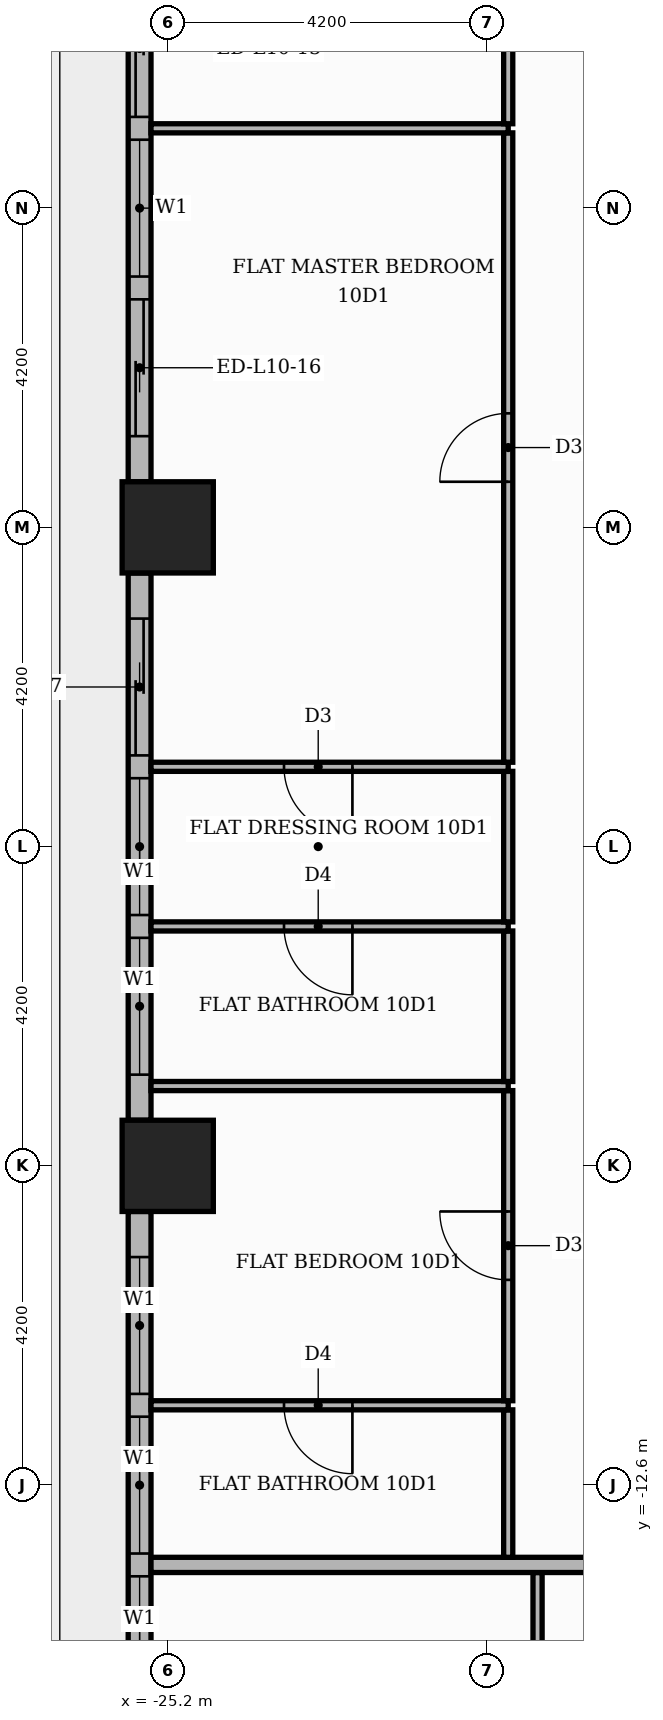
"""IFC4 building model, lengths in metres.
Left out: names, types, materials, properties, quantities, classifications, styles, units other than length and angle.
Written with IfcOpenShell. Run it as: python <this file> out.ifc"""

import sys

from ifc_helpers import new_model, si_unit, direction, frame, frame_2d, origin, origin_2d, place, context, subcontext, project, spatial, rectangle, extrude, element, fill, save


model = new_model("IFC4")
c1 = context("Model", 3, precision=1e-05, world=origin(), true_north=direction((0.0, 1.0)))
c2 = subcontext(c1, "Body", "Model", "MODEL_VIEW")
j1 = project(units=[si_unit("LENGTHUNIT", "METRE"), si_unit("PLANEANGLEUNIT", "RADIAN")], contexts=[c1])
p1 = place(None, origin())
s1 = spatial("IfcSite", under=j1, at=p1, CompositionType="ELEMENT")
p2 = place(p1, origin())
s2 = spatial("IfcBuilding", under=s1, at=p2, CompositionType="ELEMENT")
p3 = place(p2, frame((0.0, 0.0, 46.5)))
s3 = spatial("IfcBuildingStorey", under=s2, at=p3, CompositionType="ELEMENT", Elevation=46.5)
for number, where, z_axis, x_axis in (
    (1, (-25.2, 0.0, 0.0), (0.0, 0.0, 1.0), (1.0, 0.0, 0.0)),
    (2, (-25.2, -8.4, 0.0), (0.0, 0.0, 1.0), (1.0, 0.0, 0.0)),
):
    element("IfcColumn", number, at=place(p3, frame(where, z_axis=z_axis, x_axis=x_axis)), inside=s3, PredefinedType="COLUMN", context=c2, shape_type="SweptSolid", body=[
        extrude(rectangle(XDim=1.2, YDim=1.2, at=origin_2d()), origin(), (0.0, 0.0, 1.0), 3.9),
    ])
p4 = place(p3, frame((-25.57, 7.8, 0.0), z_axis=(0.0, 0.0, 1.0), x_axis=(0.0, -1.0, 0.0)))
e3 = element("IfcWall", 3, at=p4, inside=s3, PredefinedType="STANDARD", context=c2, shape_type="SweptSolid", body=[
    extrude(rectangle(XDim=7.2, YDim=0.3, at=frame_2d((3.6, 0.0))), origin(), (0.0, 0.0, 1.0), 3.48),
])
p5 = place(p4, frame((0.6, 0.0, 0.0)))
e4 = element("IfcOpeningElement", 4, at=p5, cuts=e3, PredefinedType="OPENING", context=c2, shape_type="SweptSolid", body=[
    extrude(rectangle(XDim=1.8, YDim=2.4, at=frame_2d((0.9, 1.2))), frame((0.0, 0.16, 0.0), z_axis=(0.0, -1.0, 0.0), x_axis=(1.0, 0.0, 0.0)), (0.0, 0.0, 1.0), 0.32),
])
p6 = place(p4, frame((2.7, 0.0, 0.9)))
e5 = element("IfcOpeningElement", 5, at=p6, cuts=e3, PredefinedType="OPENING", context=c2, shape_type="SweptSolid", body=[
    extrude(rectangle(XDim=1.8, YDim=2.1, at=frame_2d((0.9, 1.05))), frame((0.0, 0.16, 0.0), z_axis=(0.0, -1.0, 0.0), x_axis=(1.0, 0.0, 0.0)), (0.0, 0.0, 1.0), 0.32),
])
p7 = place(p4, frame((4.8, 0.0, 0.0)))
e6 = element("IfcOpeningElement", 6, at=p7, cuts=e3, PredefinedType="OPENING", context=c2, shape_type="SweptSolid", body=[
    extrude(rectangle(XDim=1.8, YDim=2.4, at=frame_2d((0.9, 1.2))), frame((0.0, 0.16, 0.0), z_axis=(0.0, -1.0, 0.0), x_axis=(1.0, 0.0, 0.0)), (0.0, 0.0, 1.0), 0.32),
])
p8 = place(p3, frame((-25.57, -0.6, 0.0), z_axis=(0.0, 0.0, 1.0), x_axis=(0.0, -1.0, 0.0)))
e7 = element("IfcWall", 7, at=p8, inside=s3, PredefinedType="STANDARD", context=c2, shape_type="SweptSolid", body=[
    extrude(rectangle(XDim=7.2, YDim=0.3, at=frame_2d((3.6, 0.0))), origin(), (0.0, 0.0, 1.0), 3.48),
])
p9 = place(p8, frame((0.6, 0.0, 0.0)))
e8 = element("IfcOpeningElement", 8, at=p9, cuts=e7, PredefinedType="OPENING", context=c2, shape_type="SweptSolid", body=[
    extrude(rectangle(XDim=1.8, YDim=2.4, at=frame_2d((0.9, 1.2))), frame((0.0, 0.16, 0.0), z_axis=(0.0, -1.0, 0.0), x_axis=(1.0, 0.0, 0.0)), (0.0, 0.0, 1.0), 0.32),
])
p10 = place(p8, frame((2.7, 0.0, 0.9)))
e9 = element("IfcOpeningElement", 9, at=p10, cuts=e7, PredefinedType="OPENING", context=c2, shape_type="SweptSolid", body=[
    extrude(rectangle(XDim=1.8, YDim=2.1, at=frame_2d((0.9, 1.05))), frame((0.0, 0.16, 0.0), z_axis=(0.0, -1.0, 0.0), x_axis=(1.0, 0.0, 0.0)), (0.0, 0.0, 1.0), 0.32),
])
p11 = place(p8, frame((4.8, 0.0, 0.9)))
e10 = element("IfcOpeningElement", 10, at=p11, cuts=e7, PredefinedType="OPENING", context=c2, shape_type="SweptSolid", body=[
    extrude(rectangle(XDim=1.8, YDim=2.1, at=frame_2d((0.9, 1.05))), frame((0.0, 0.16, 0.0), z_axis=(0.0, -1.0, 0.0), x_axis=(1.0, 0.0, 0.0)), (0.0, 0.0, 1.0), 0.32),
])
p12 = place(p3, frame((-25.57, -9.0, 0.0), z_axis=(0.0, 0.0, 1.0), x_axis=(0.0, -1.0, 0.0)))
e11 = element("IfcWall", 11, at=p12, inside=s3, PredefinedType="STANDARD", context=c2, shape_type="SweptSolid", body=[
    extrude(rectangle(XDim=7.2, YDim=0.3, at=frame_2d((3.6, 0.0))), origin(), (0.0, 0.0, 1.0), 3.48),
])
p13 = place(p12, frame((0.6, 0.0, 0.9)))
e12 = element("IfcOpeningElement", 12, at=p13, cuts=e11, PredefinedType="OPENING", context=c2, shape_type="SweptSolid", body=[
    extrude(rectangle(XDim=1.8, YDim=2.1, at=frame_2d((0.9, 1.05))), frame((0.0, 0.16, 0.0), z_axis=(0.0, -1.0, 0.0), x_axis=(1.0, 0.0, 0.0)), (0.0, 0.0, 1.0), 0.32),
])
p14 = place(p12, frame((2.7, 0.0, 0.9)))
e13 = element("IfcOpeningElement", 13, at=p14, cuts=e11, PredefinedType="OPENING", context=c2, shape_type="SweptSolid", body=[
    extrude(rectangle(XDim=1.8, YDim=2.1, at=frame_2d((0.9, 1.05))), frame((0.0, 0.16, 0.0), z_axis=(0.0, -1.0, 0.0), x_axis=(1.0, 0.0, 0.0)), (0.0, 0.0, 1.0), 0.32),
])
p15 = place(p12, frame((4.8, 0.0, 0.9)))
e14 = element("IfcOpeningElement", 14, at=p15, cuts=e11, PredefinedType="OPENING", context=c2, shape_type="SweptSolid", body=[
    extrude(rectangle(XDim=1.8, YDim=2.1, at=frame_2d((0.9, 1.05))), frame((0.0, 0.16, 0.0), z_axis=(0.0, -1.0, 0.0), x_axis=(1.0, 0.0, 0.0)), (0.0, 0.0, 1.0), 0.32),
])
p16 = place(p3, frame((-20.334, -20.66, 0.0), z_axis=(0.0, 0.0, 1.0), x_axis=(0.0, 1.0, 0.0)))
e15 = element("IfcWall", 15, at=p16, inside=s3, PredefinedType="PARTITIONING", context=c2, shape_type="SweptSolid", body=[
    extrude(rectangle(XDim=6.91, YDim=0.12, at=frame_2d((3.455, 0.0))), origin(), (0.0, 0.0, 1.0), 3.48),
])
p17 = place(p16, frame((4.792, 0.0, 0.0)))
e16 = element("IfcOpeningElement", 16, at=p17, cuts=e15, PredefinedType="OPENING", context=c2, shape_type="SweptSolid", body=[
    extrude(rectangle(XDim=0.9, YDim=2.1, at=frame_2d((0.45, 1.05))), frame((0.0, 0.07, 0.0), z_axis=(0.0, -1.0, 0.0), x_axis=(1.0, 0.0, 0.0)), (0.0, 0.0, 1.0), 0.14),
])
p18 = place(p3, frame((-25.42, -13.65, 0.0), z_axis=(0.0, 0.0, 1.0), x_axis=(1.0, 0.0, 0.0)))
e17 = element("IfcWall", 17, at=p18, inside=s3, PredefinedType="PARTITIONING", context=c2, shape_type="SweptSolid", body=[
    extrude(rectangle(XDim=39.07, YDim=0.2, at=frame_2d((19.535, 0.0))), origin(), (0.0, 0.0, 1.0), 3.48),
])
p19 = place(p18, frame((13.32, 0.0, 0.0)))
e18 = element("IfcOpeningElement", 18, at=p19, cuts=e17, PredefinedType="OPENING", context=c2, shape_type="SweptSolid", body=[
    extrude(rectangle(XDim=1.1, YDim=2.4, at=frame_2d((0.55, 1.2))), frame((0.0, 0.11, 0.0), z_axis=(0.0, -1.0, 0.0), x_axis=(1.0, 0.0, 0.0)), (0.0, 0.0, 1.0), 0.22),
])
p20 = place(p18, frame((21.72, 0.0, 0.0)))
e19 = element("IfcOpeningElement", 19, at=p20, cuts=e17, PredefinedType="OPENING", context=c2, shape_type="SweptSolid", body=[
    extrude(rectangle(XDim=1.1, YDim=2.4, at=frame_2d((0.55, 1.2))), frame((0.0, 0.11, 0.0), z_axis=(0.0, -1.0, 0.0), x_axis=(1.0, 0.0, 0.0)), (0.0, 0.0, 1.0), 0.22),
])
p21 = place(p3, frame((-20.72, -13.55, 0.0), z_axis=(0.0, 0.0, 1.0), x_axis=(0.0, 1.0, 0.0)))
e20 = element("IfcWall", 20, at=p21, inside=s3, PredefinedType="PARTITIONING", context=c2, shape_type="SweptSolid", body=[
    extrude(rectangle(XDim=1.94, YDim=0.12, at=frame_2d((0.97, 0.0))), origin(), (0.0, 0.0, 1.0), 3.48),
])
p22 = place(p3, frame((-25.42, -11.55, 0.0), z_axis=(0.0, 0.0, 1.0), x_axis=(1.0, 0.0, 0.0)))
e21 = element("IfcWall", 21, at=p22, inside=s3, PredefinedType="PARTITIONING", context=c2, shape_type="SweptSolid", body=[
    extrude(rectangle(XDim=4.7, YDim=0.12, at=frame_2d((2.35, 0.0))), origin(), (0.0, 0.0, 1.0), 3.48),
])
p23 = place(p22, frame((1.75, 0.0, 0.0)))
e22 = element("IfcOpeningElement", 22, at=p23, cuts=e21, PredefinedType="OPENING", context=c2, shape_type="SweptSolid", body=[
    extrude(rectangle(XDim=0.9, YDim=2.1, at=frame_2d((0.45, 1.05))), frame((0.0, 0.07, 0.0), z_axis=(0.0, -1.0, 0.0), x_axis=(1.0, 0.0, 0.0)), (0.0, 0.0, 1.0), 0.14),
])
p24 = place(p3, frame((-20.72, -11.49, 0.0), z_axis=(0.0, 0.0, 1.0), x_axis=(0.0, 1.0, 0.0)))
e23 = element("IfcWall", 23, at=p24, inside=s3, PredefinedType="PARTITIONING", context=c2, shape_type="SweptSolid", body=[
    extrude(rectangle(XDim=4.08, YDim=0.12, at=frame_2d((2.04, 0.0))), origin(), (0.0, 0.0, 1.0), 3.48),
])
p25 = place(p24, frame((1.59, 0.0, 0.0)))
e24 = element("IfcOpeningElement", 24, at=p25, cuts=e23, PredefinedType="OPENING", context=c2, shape_type="SweptSolid", body=[
    extrude(rectangle(XDim=0.9, YDim=2.1, at=frame_2d((0.45, 1.05))), frame((0.0, 0.07, 0.0), z_axis=(0.0, -1.0, 0.0), x_axis=(1.0, 0.0, 0.0)), (0.0, 0.0, 1.0), 0.14),
])
p26 = place(p3, frame((-25.42, -7.35, 0.0), z_axis=(0.0, 0.0, 1.0), x_axis=(1.0, 0.0, 0.0)))
e25 = element("IfcWall", 25, at=p26, inside=s3, PredefinedType="PARTITIONING", context=c2, shape_type="SweptSolid", body=[
    extrude(rectangle(XDim=4.7, YDim=0.12, at=frame_2d((2.35, 0.0))), origin(), (0.0, 0.0, 1.0), 3.48),
])
p27 = place(p3, frame((-20.72, -7.29, 0.0), z_axis=(0.0, 0.0, 1.0), x_axis=(0.0, 1.0, 0.0)))
e26 = element("IfcWall", 26, at=p27, inside=s3, PredefinedType="PARTITIONING", context=c2, shape_type="SweptSolid", body=[
    extrude(rectangle(XDim=1.98, YDim=0.12, at=frame_2d((0.99, 0.0))), origin(), (0.0, 0.0, 1.0), 3.48),
])
p28 = place(p3, frame((-25.42, -5.25, 0.0), z_axis=(0.0, 0.0, 1.0), x_axis=(1.0, 0.0, 0.0)))
e27 = element("IfcWall", 27, at=p28, inside=s3, PredefinedType="PARTITIONING", context=c2, shape_type="SweptSolid", body=[
    extrude(rectangle(XDim=4.7, YDim=0.12, at=frame_2d((2.35, 0.0))), origin(), (0.0, 0.0, 1.0), 3.48),
])
p29 = place(p28, frame((1.75, 0.0, 0.0)))
e28 = element("IfcOpeningElement", 28, at=p29, cuts=e27, PredefinedType="OPENING", context=c2, shape_type="SweptSolid", body=[
    extrude(rectangle(XDim=0.9, YDim=2.1, at=frame_2d((0.45, 1.05))), frame((0.0, 0.07, 0.0), z_axis=(0.0, -1.0, 0.0), x_axis=(1.0, 0.0, 0.0)), (0.0, 0.0, 1.0), 0.14),
])
p30 = place(p3, frame((-20.72, -5.19, 0.0), z_axis=(0.0, 0.0, 1.0), x_axis=(0.0, 1.0, 0.0)))
e29 = element("IfcWall", 29, at=p30, inside=s3, PredefinedType="PARTITIONING", context=c2, shape_type="SweptSolid", body=[
    extrude(rectangle(XDim=1.98, YDim=0.12, at=frame_2d((0.99, 0.0))), origin(), (0.0, 0.0, 1.0), 3.48),
])
p31 = place(p3, frame((-25.42, -3.15, 0.0), z_axis=(0.0, 0.0, 1.0), x_axis=(1.0, 0.0, 0.0)))
e30 = element("IfcWall", 30, at=p31, inside=s3, PredefinedType="PARTITIONING", context=c2, shape_type="SweptSolid", body=[
    extrude(rectangle(XDim=4.7, YDim=0.12, at=frame_2d((2.35, 0.0))), origin(), (0.0, 0.0, 1.0), 3.48),
])
p32 = place(p31, frame((1.75, 0.0, 0.0)))
e31 = element("IfcOpeningElement", 31, at=p32, cuts=e30, PredefinedType="OPENING", context=c2, shape_type="SweptSolid", body=[
    extrude(rectangle(XDim=0.9, YDim=2.1, at=frame_2d((0.45, 1.05))), frame((0.0, 0.07, 0.0), z_axis=(0.0, -1.0, 0.0), x_axis=(1.0, 0.0, 0.0)), (0.0, 0.0, 1.0), 0.14),
])
p33 = place(p3, frame((-20.72, -3.09, 0.0), z_axis=(0.0, 0.0, 1.0), x_axis=(0.0, 1.0, 0.0)))
e32 = element("IfcWall", 32, at=p33, inside=s3, PredefinedType="PARTITIONING", context=c2, shape_type="SweptSolid", body=[
    extrude(rectangle(XDim=8.28, YDim=0.12, at=frame_2d((4.14, 0.0))), origin(), (0.0, 0.0, 1.0), 3.48),
])
p34 = place(p33, frame((3.69, 0.0, 0.0)))
e33 = element("IfcOpeningElement", 33, at=p34, cuts=e32, PredefinedType="OPENING", context=c2, shape_type="SweptSolid", body=[
    extrude(rectangle(XDim=0.9, YDim=2.1, at=frame_2d((0.45, 1.05))), frame((0.0, 0.07, 0.0), z_axis=(0.0, -1.0, 0.0), x_axis=(1.0, 0.0, 0.0)), (0.0, 0.0, 1.0), 0.14),
])
p35 = place(p3, frame((-25.42, 5.25, 0.0), z_axis=(0.0, 0.0, 1.0), x_axis=(1.0, 0.0, 0.0)))
e34 = element("IfcWall", 34, at=p35, inside=s3, PredefinedType="PARTITIONING", context=c2, shape_type="SweptSolid", body=[
    extrude(rectangle(XDim=4.7, YDim=0.12, at=frame_2d((2.35, 0.0))), origin(), (0.0, 0.0, 1.0), 3.48),
])
p36 = place(p3, frame((-20.72, 5.31, 0.0), z_axis=(0.0, 0.0, 1.0), x_axis=(0.0, 1.0, 0.0)))
e35 = element("IfcWall", 35, at=p36, inside=s3, PredefinedType="PARTITIONING", context=c2, shape_type="SweptSolid", body=[
    extrude(rectangle(XDim=8.28, YDim=0.12, at=frame_2d((4.14, 0.0))), origin(), (0.0, 0.0, 1.0), 3.48),
])
p37 = place(p36, frame((3.64, 0.0, 0.0)))
e36 = element("IfcOpeningElement", 36, at=p37, cuts=e35, PredefinedType="OPENING", context=c2, shape_type="SweptSolid", body=[
    extrude(rectangle(XDim=1.0, YDim=2.1, at=frame_2d((0.5, 1.05))), frame((0.0, 0.07, 0.0), z_axis=(0.0, -1.0, 0.0), x_axis=(1.0, 0.0, 0.0)), (0.0, 0.0, 1.0), 0.14),
])
p38 = place(p5, origin())
e37 = element("IfcDoor", 37, at=p38, inside=s3, OperationType="SLIDING_TO_LEFT", PredefinedType="DOOR", context=c2, shape_type="SweptSolid", body=[
    extrude(rectangle(XDim=1.8, YDim=2.4, at=frame_2d((0.9, 1.2))), frame((0.0, 0.025, 0.0), z_axis=(0.0, -1.0, 0.0), x_axis=(1.0, 0.0, 0.0)), (0.0, 0.0, 1.0), 0.05),
])
fill(e4, e37)
p39 = place(p6, origin())
e38 = element("IfcWindow", 38, at=p39, inside=s3, PartitioningType="SINGLE_PANEL", PredefinedType="WINDOW", context=c2, shape_type="SweptSolid", body=[
    extrude(rectangle(XDim=1.8, YDim=2.1, at=frame_2d((0.9, 1.05))), frame((0.0, 0.03, 0.0), z_axis=(0.0, -1.0, 0.0), x_axis=(1.0, 0.0, 0.0)), (0.0, 0.0, 1.0), 0.06),
])
fill(e5, e38)
p40 = place(p7, origin())
e39 = element("IfcDoor", 39, at=p40, inside=s3, OperationType="SLIDING_TO_RIGHT", PredefinedType="DOOR", context=c2, shape_type="SweptSolid", body=[
    extrude(rectangle(XDim=1.8, YDim=2.4, at=frame_2d((0.9, 1.2))), frame((0.0, 0.025, 0.0), z_axis=(0.0, -1.0, 0.0), x_axis=(1.0, 0.0, 0.0)), (0.0, 0.0, 1.0), 0.05),
])
fill(e6, e39)
p41 = place(p9, origin())
e40 = element("IfcDoor", 40, at=p41, inside=s3, OperationType="SLIDING_TO_LEFT", PredefinedType="DOOR", context=c2, shape_type="SweptSolid", body=[
    extrude(rectangle(XDim=1.8, YDim=2.4, at=frame_2d((0.9, 1.2))), frame((0.0, 0.025, 0.0), z_axis=(0.0, -1.0, 0.0), x_axis=(1.0, 0.0, 0.0)), (0.0, 0.0, 1.0), 0.05),
])
fill(e8, e40)
p42 = place(p10, origin())
e41 = element("IfcWindow", 41, at=p42, inside=s3, PartitioningType="SINGLE_PANEL", PredefinedType="WINDOW", context=c2, shape_type="SweptSolid", body=[
    extrude(rectangle(XDim=1.8, YDim=2.1, at=frame_2d((0.9, 1.05))), frame((0.0, 0.03, 0.0), z_axis=(0.0, -1.0, 0.0), x_axis=(1.0, 0.0, 0.0)), (0.0, 0.0, 1.0), 0.06),
])
fill(e9, e41)
p43 = place(p11, origin())
e42 = element("IfcWindow", 42, at=p43, inside=s3, PartitioningType="SINGLE_PANEL", PredefinedType="WINDOW", context=c2, shape_type="SweptSolid", body=[
    extrude(rectangle(XDim=1.8, YDim=2.1, at=frame_2d((0.9, 1.05))), frame((0.0, 0.03, 0.0), z_axis=(0.0, -1.0, 0.0), x_axis=(1.0, 0.0, 0.0)), (0.0, 0.0, 1.0), 0.06),
])
fill(e10, e42)
p44 = place(p13, origin())
e43 = element("IfcWindow", 43, at=p44, inside=s3, PartitioningType="SINGLE_PANEL", PredefinedType="WINDOW", context=c2, shape_type="SweptSolid", body=[
    extrude(rectangle(XDim=1.8, YDim=2.1, at=frame_2d((0.9, 1.05))), frame((0.0, 0.03, 0.0), z_axis=(0.0, -1.0, 0.0), x_axis=(1.0, 0.0, 0.0)), (0.0, 0.0, 1.0), 0.06),
])
fill(e12, e43)
p45 = place(p14, origin())
e44 = element("IfcWindow", 44, at=p45, inside=s3, PartitioningType="SINGLE_PANEL", PredefinedType="WINDOW", context=c2, shape_type="SweptSolid", body=[
    extrude(rectangle(XDim=1.8, YDim=2.1, at=frame_2d((0.9, 1.05))), frame((0.0, 0.03, 0.0), z_axis=(0.0, -1.0, 0.0), x_axis=(1.0, 0.0, 0.0)), (0.0, 0.0, 1.0), 0.06),
])
fill(e13, e44)
p46 = place(p15, origin())
e45 = element("IfcWindow", 45, at=p46, inside=s3, PartitioningType="SINGLE_PANEL", PredefinedType="WINDOW", context=c2, shape_type="SweptSolid", body=[
    extrude(rectangle(XDim=1.8, YDim=2.1, at=frame_2d((0.9, 1.05))), frame((0.0, 0.03, 0.0), z_axis=(0.0, -1.0, 0.0), x_axis=(1.0, 0.0, 0.0)), (0.0, 0.0, 1.0), 0.06),
])
fill(e14, e45)
p47 = place(p34, origin())
e46 = element("IfcDoor", 46, at=p47, inside=s3, OperationType="SINGLE_SWING_LEFT", PredefinedType="DOOR", context=c2, shape_type="SweptSolid", body=[
    extrude(rectangle(XDim=0.9, YDim=2.1, at=frame_2d((0.45, 1.05))), frame((0.0, 0.025, 0.0), z_axis=(0.0, -1.0, 0.0), x_axis=(1.0, 0.0, 0.0)), (0.0, 0.0, 1.0), 0.05),
])
fill(e33, e46)
p48 = place(p32, frame((0.9, 0.0, 0.0), z_axis=(0.0, 0.0, 1.0), x_axis=(-1.0, 0.0, 0.0)))
e47 = element("IfcDoor", 47, at=p48, inside=s3, OperationType="SINGLE_SWING_RIGHT", PredefinedType="DOOR", context=c2, shape_type="SweptSolid", body=[
    extrude(rectangle(XDim=0.9, YDim=2.1, at=frame_2d((0.45, 1.05))), frame((0.0, 0.025, 0.0), z_axis=(0.0, -1.0, 0.0), x_axis=(1.0, 0.0, 0.0)), (0.0, 0.0, 1.0), 0.05),
])
fill(e31, e47)
p49 = place(p29, frame((0.9, 0.0, 0.0), z_axis=(0.0, 0.0, 1.0), x_axis=(-1.0, 0.0, 0.0)))
e48 = element("IfcDoor", 48, at=p49, inside=s3, OperationType="SINGLE_SWING_RIGHT", PredefinedType="DOOR", context=c2, shape_type="SweptSolid", body=[
    extrude(rectangle(XDim=0.9, YDim=2.1, at=frame_2d((0.45, 1.05))), frame((0.0, 0.025, 0.0), z_axis=(0.0, -1.0, 0.0), x_axis=(1.0, 0.0, 0.0)), (0.0, 0.0, 1.0), 0.05),
])
fill(e28, e48)
p50 = place(p25, origin())
e49 = element("IfcDoor", 49, at=p50, inside=s3, OperationType="SINGLE_SWING_RIGHT", PredefinedType="DOOR", context=c2, shape_type="SweptSolid", body=[
    extrude(rectangle(XDim=0.9, YDim=2.1, at=frame_2d((0.45, 1.05))), frame((0.0, 0.025, 0.0), z_axis=(0.0, -1.0, 0.0), x_axis=(1.0, 0.0, 0.0)), (0.0, 0.0, 1.0), 0.05),
])
fill(e24, e49)
p51 = place(p23, frame((0.9, 0.0, 0.0), z_axis=(0.0, 0.0, 1.0), x_axis=(-1.0, 0.0, 0.0)))
e50 = element("IfcDoor", 50, at=p51, inside=s3, OperationType="SINGLE_SWING_RIGHT", PredefinedType="DOOR", context=c2, shape_type="SweptSolid", body=[
    extrude(rectangle(XDim=0.9, YDim=2.1, at=frame_2d((0.45, 1.05))), frame((0.0, 0.025, 0.0), z_axis=(0.0, -1.0, 0.0), x_axis=(1.0, 0.0, 0.0)), (0.0, 0.0, 1.0), 0.05),
])
fill(e22, e50)
save(model, sys.argv[1])
